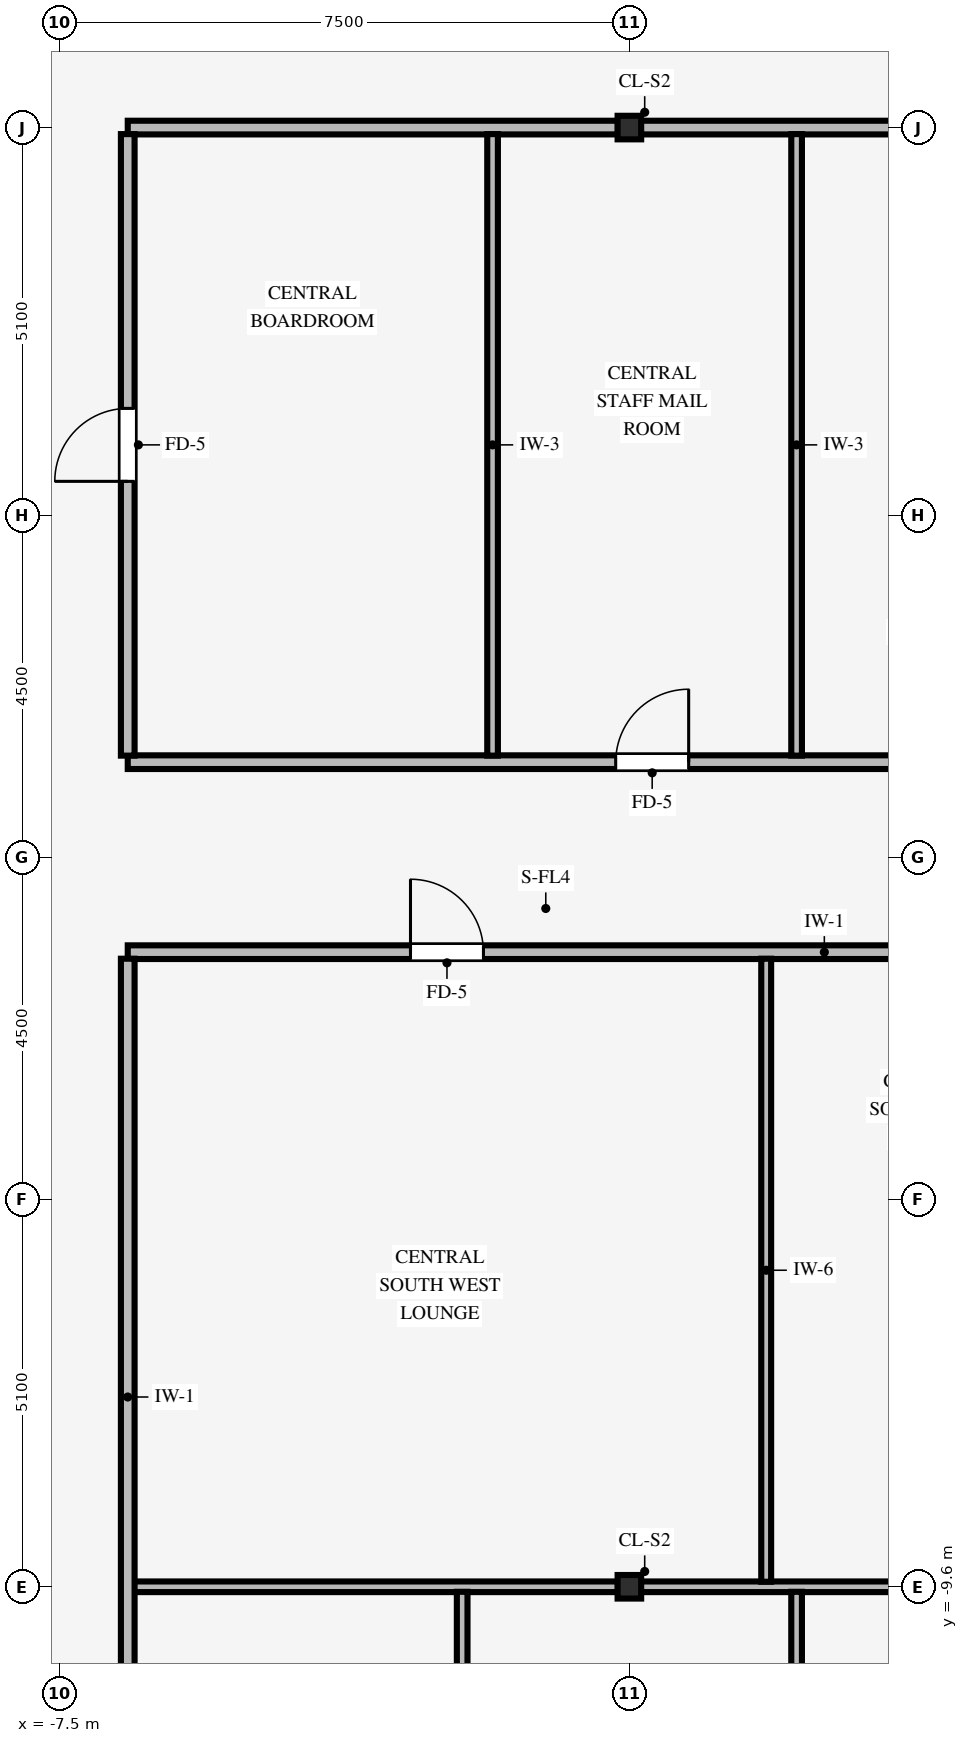
"""IFC4 building model, lengths in metres.
Left out: names, types, materials, properties, quantities, classifications, styles, units other than length and angle.
Written with IfcOpenShell. Run it as: python <this file> out.ifc"""

import sys

from ifc_helpers import new_model, si_unit, direction, frame, frame_2d, origin, origin_2d, place, context, subcontext, project, spatial, rectangle, i_section, extrude, source, transform, mapped, element, fill, save


model = new_model("IFC4")
c1 = context("Model", 3, precision=1e-05, world=origin(), true_north=direction((0.0, 1.0)))
c2 = subcontext(c1, "Body", "Model", "MODEL_VIEW")
j1 = project(units=[si_unit("LENGTHUNIT", "METRE"), si_unit("PLANEANGLEUNIT", "RADIAN")], contexts=[c1])
p1 = place(None, origin())
s1 = spatial("IfcSite", under=j1, at=p1, CompositionType="ELEMENT")
p2 = place(p1, origin())
s2 = spatial("IfcBuilding", under=s1, at=p2, CompositionType="ELEMENT")
p3 = place(p2, frame((0.0, 0.0, 268.9)))
s3 = spatial("IfcBuildingStorey", under=s2, at=p3, CompositionType="ELEMENT", Elevation=268.9)
for number, where, z_axis, x_axis in (
    (1, (0.0, -9.6, 0.0), (0.0, 0.0, 1.0), (1.0, 0.0, 0.0)),
    (2, (0.0, 9.6, 0.0), (0.0, 0.0, 1.0), (1.0, 0.0, 0.0)),
):
    element("IfcColumn", number, at=place(p3, frame(where, z_axis=z_axis, x_axis=x_axis)), inside=s3, PredefinedType="COLUMN", context=c2, shape_type="SweptSolid", body=[
        extrude(i_section(OverallWidth=0.31, OverallDepth=0.31, WebThickness=0.015, FlangeThickness=0.015, FilletRadius=0.015, at=origin_2d()), origin(), (0.0, 0.0, 1.0), 3.37),
    ])
p4 = place(p3, frame((-6.534, -9.6, 0.0), z_axis=(0.0, 0.0, 1.0), x_axis=(1.0, 0.0, 0.0)))
e3 = element("IfcWall", 3, at=p4, inside=s3, PredefinedType="PARTITIONING", context=c2, shape_type="SweptSolid", body=[
    extrude(rectangle(XDim=6.383, YDim=0.14, at=frame_2d((3.191, 0.0))), origin(), (0.0, 0.0, 1.0), 2.405),
])
p5 = place(p3, frame((0.151, -9.6, 0.0), z_axis=(0.0, 0.0, 1.0), x_axis=(1.0, 0.0, 0.0)))
e4 = element("IfcWall", 4, at=p5, inside=s3, PredefinedType="PARTITIONING", context=c2, shape_type="SweptSolid", body=[
    extrude(rectangle(XDim=6.388, YDim=0.14, at=frame_2d((3.194, 0.0))), origin(), (0.0, 0.0, 1.0), 2.405),
])
p6 = place(p3, frame((-6.6, -1.25, 0.0), z_axis=(0.0, 0.0, 1.0), x_axis=(1.0, 0.0, 0.0)))
e5 = element("IfcWall", 5, at=p6, inside=s3, PredefinedType="PARTITIONING", context=c2, shape_type="SweptSolid", body=[
    extrude(rectangle(XDim=13.2, YDim=0.18, at=frame_2d((6.6, 0.0))), origin(), (0.0, 0.0, 1.0), 3.36),
])
p7 = place(p6, frame((3.72, 0.0, 0.0)))
e6 = element("IfcOpeningElement", 6, at=p7, cuts=e5, PredefinedType="OPENING", context=c2, shape_type="SweptSolid", body=[
    extrude(rectangle(XDim=0.96, YDim=2.1, at=frame_2d((0.48, 1.05))), frame((0.0, 0.1, 0.0), z_axis=(0.0, -1.0, 0.0), x_axis=(1.0, 0.0, 0.0)), (0.0, 0.0, 1.0), 0.2),
])
p8 = place(p3, frame((-6.6, 1.25, 0.0), z_axis=(0.0, 0.0, 1.0), x_axis=(1.0, 0.0, 0.0)))
e7 = element("IfcWall", 7, at=p8, inside=s3, PredefinedType="PARTITIONING", context=c2, shape_type="SweptSolid", body=[
    extrude(rectangle(XDim=13.2, YDim=0.18, at=frame_2d((6.6, 0.0))), origin(), (0.0, 0.0, 1.0), 3.36),
])
p9 = place(p8, frame((6.42, 0.0, 0.0)))
e8 = element("IfcOpeningElement", 8, at=p9, cuts=e7, PredefinedType="OPENING", context=c2, shape_type="SweptSolid", body=[
    extrude(rectangle(XDim=0.96, YDim=2.1, at=frame_2d((0.48, 1.05))), frame((0.0, 0.1, 0.0), z_axis=(0.0, -1.0, 0.0), x_axis=(1.0, 0.0, 0.0)), (0.0, 0.0, 1.0), 0.2),
])
for number, where, z_axis, x_axis in (
    (9, (-6.6, 9.6, 0.0), (0.0, 0.0, 1.0), (1.0, 0.0, 0.0)),
    (10, (0.151, 9.6, 0.0), (0.0, 0.0, 1.0), (1.0, 0.0, 0.0)),
):
    element("IfcWall", number, at=place(p3, frame(where, z_axis=z_axis, x_axis=x_axis)), inside=s3, PredefinedType="PARTITIONING", context=c2, shape_type="SweptSolid", body=[
        extrude(rectangle(XDim=6.449, YDim=0.18, at=frame_2d((3.225, 0.0))), origin(), (0.0, 0.0, 1.0), 2.405),
    ])
p10 = place(p3, frame((-6.6, -19.1, 0.0), z_axis=(0.0, 0.0, 1.0), x_axis=(0.0, 1.0, 0.0)))
e11 = element("IfcWall", 11, at=p10, inside=s3, PredefinedType="PARTITIONING", context=c2, shape_type="SweptSolid", body=[
    extrude(rectangle(XDim=17.764, YDim=0.18, at=frame_2d((8.882, 0.0))), origin(), (0.0, 0.0, 1.0), 3.36),
])
p11 = place(p10, frame((4.82, 0.0, 0.0)))
e12 = element("IfcOpeningElement", 12, at=p11, cuts=e11, PredefinedType="OPENING", context=c2, shape_type="SweptSolid", body=[
    extrude(rectangle(XDim=0.96, YDim=2.1, at=frame_2d((0.48, 1.05))), frame((0.0, 0.1, 0.0), z_axis=(0.0, -1.0, 0.0), x_axis=(1.0, 0.0, 0.0)), (0.0, 0.0, 1.0), 0.2),
])
p12 = place(p3, frame((-6.6, 1.336, 0.0), z_axis=(0.0, 0.0, 1.0), x_axis=(0.0, 1.0, 0.0)))
e13 = element("IfcWall", 13, at=p12, inside=s3, PredefinedType="PARTITIONING", context=c2, shape_type="SweptSolid", body=[
    extrude(rectangle(XDim=8.178, YDim=0.18, at=frame_2d((4.089, 0.0))), origin(), (0.0, 0.0, 1.0), 3.36),
])
p13 = place(p12, frame((3.609, 0.0, 0.0)))
e14 = element("IfcOpeningElement", 14, at=p13, cuts=e13, PredefinedType="OPENING", context=c2, shape_type="SweptSolid", body=[
    extrude(rectangle(XDim=0.96, YDim=2.1, at=frame_2d((0.48, 1.05))), frame((0.0, 0.1, 0.0), z_axis=(0.0, -1.0, 0.0), x_axis=(1.0, 0.0, 0.0)), (0.0, 0.0, 1.0), 0.2),
])
p14 = place(p3, frame((-2.2, -19.1, 0.0), z_axis=(0.0, 0.0, 1.0), x_axis=(0.0, 1.0, 0.0)))
e15 = element("IfcWall", 15, at=p14, inside=s3, PredefinedType="PARTITIONING", context=c2, shape_type="SweptSolid", body=[
    extrude(rectangle(XDim=9.434, YDim=0.14, at=frame_2d((4.717, 0.0))), origin(), (0.0, 0.0, 1.0), 3.36),
])
p15 = place(p3, frame((-1.8, 1.336, 0.0), z_axis=(0.0, 0.0, 1.0), x_axis=(0.0, 1.0, 0.0)))
e16 = element("IfcWall", 16, at=p15, inside=s3, PredefinedType="PARTITIONING", context=c2, shape_type="SweptSolid", body=[
    extrude(rectangle(XDim=8.178, YDim=0.14, at=frame_2d((4.089, 0.0))), origin(), (0.0, 0.0, 1.0), 3.36),
])
p16 = place(p3, frame((1.8, -9.534, 0.0), z_axis=(0.0, 0.0, 1.0), x_axis=(0.0, 1.0, 0.0)))
e17 = element("IfcWall", 17, at=p16, inside=s3, PredefinedType="PARTITIONING", context=c2, shape_type="SweptSolid", body=[
    extrude(rectangle(XDim=8.198, YDim=0.13, at=frame_2d((4.099, 0.0))), origin(), (0.0, 0.0, 1.0), 3.36),
])
p17 = place(p3, frame((2.2, -19.1, 0.0), z_axis=(0.0, 0.0, 1.0), x_axis=(0.0, 1.0, 0.0)))
e18 = element("IfcWall", 18, at=p17, inside=s3, PredefinedType="PARTITIONING", context=c2, shape_type="SweptSolid", body=[
    extrude(rectangle(XDim=9.434, YDim=0.14, at=frame_2d((4.717, 0.0))), origin(), (0.0, 0.0, 1.0), 3.36),
])
p18 = place(p17, frame((4.247, 0.0, 0.0)))
e19 = element("IfcOpeningElement", 19, at=p18, cuts=e18, PredefinedType="OPENING", context=c2, shape_type="SweptSolid", body=[
    extrude(rectangle(XDim=0.94, YDim=2.1, at=frame_2d((0.47, 1.05))), frame((0.0, 0.08, 0.0), z_axis=(0.0, -1.0, 0.0), x_axis=(1.0, 0.0, 0.0)), (0.0, 0.0, 1.0), 0.16),
])
p19 = place(p3, frame((2.2, 1.336, 0.0), z_axis=(0.0, 0.0, 1.0), x_axis=(0.0, 1.0, 0.0)))
e20 = element("IfcWall", 20, at=p19, inside=s3, PredefinedType="PARTITIONING", context=c2, shape_type="SweptSolid", body=[
    extrude(rectangle(XDim=8.178, YDim=0.14, at=frame_2d((4.089, 0.0))), origin(), (0.0, 0.0, 1.0), 3.36),
])
m1 = source(origin(), c2, "Body", "SweptSolid", [
    extrude(rectangle(XDim=0.96, YDim=2.1, at=frame_2d((0.48, 1.05))), frame((0.0, 0.025, 0.0), z_axis=(0.0, -1.0, 0.0), x_axis=(1.0, 0.0, 0.0)), (0.0, 0.0, 1.0), 0.05),
])
p20 = place(p7, origin())
e21 = element("IfcDoor", 21, at=p20, inside=s3, OperationType="SINGLE_SWING_LEFT", PredefinedType="DOOR", context=c2, shape_type="MappedRepresentation", body=[
    mapped(m1, transform((0.0, 0.0, 0.0), scale=1.0)),
])
fill(e6, e21)
p21 = place(p13, origin())
e22 = element("IfcDoor", 22, at=p21, inside=s3, OperationType="SINGLE_SWING_LEFT", PredefinedType="DOOR", context=c2, shape_type="MappedRepresentation", body=[
    mapped(m1, transform((0.0, 0.0, 0.0), scale=1.0)),
])
fill(e14, e22)
p22 = place(p9, origin())
e23 = element("IfcDoor", 23, at=p22, inside=s3, OperationType="SINGLE_SWING_RIGHT", PredefinedType="DOOR", context=c2, shape_type="MappedRepresentation", body=[
    mapped(m1, transform((0.0, 0.0, 0.0), scale=1.0)),
])
fill(e8, e23)
save(model, sys.argv[1])
